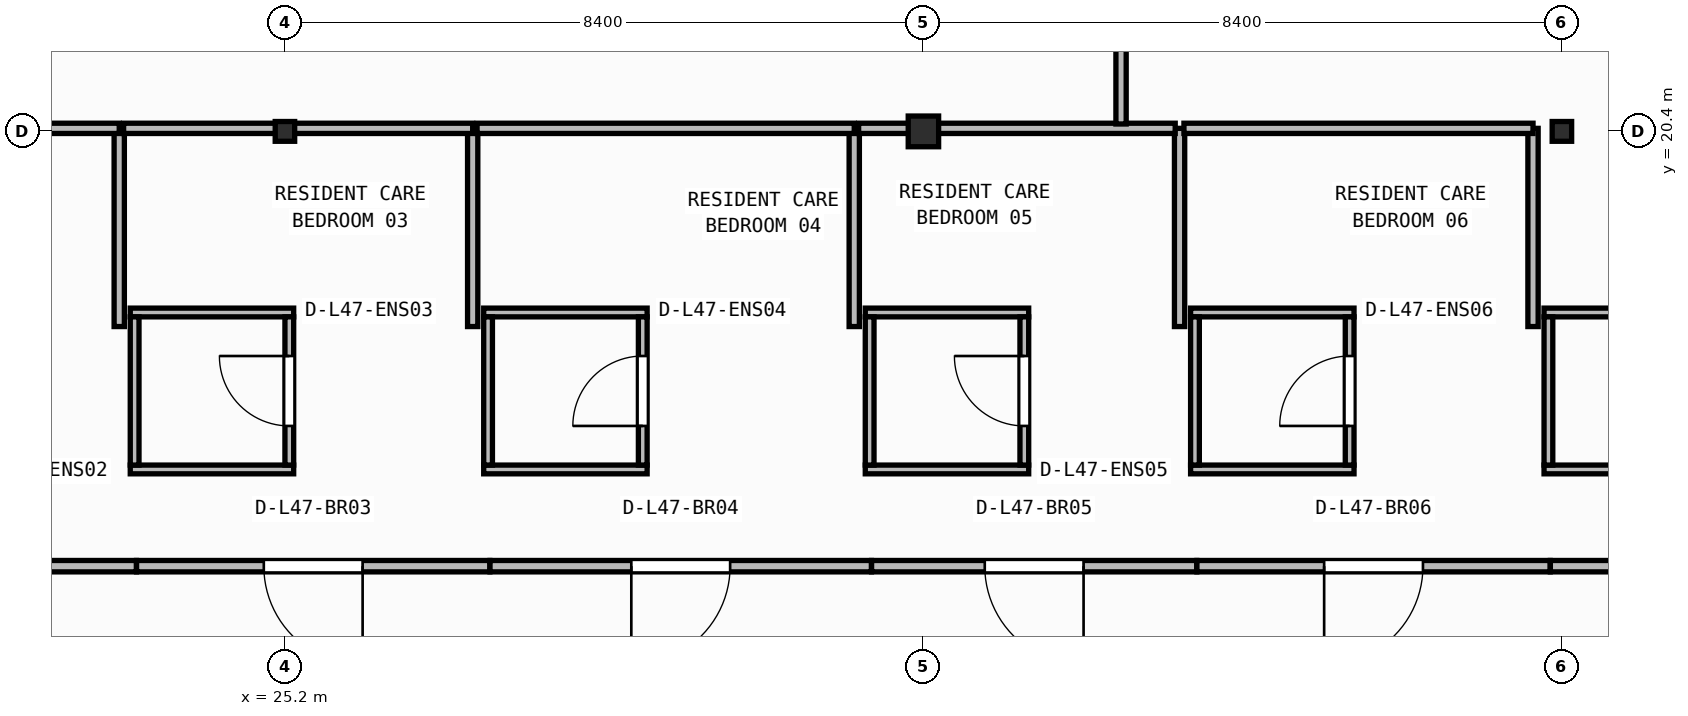
"""IFC4 building model, lengths in metres.
Left out: names, types, materials, properties, quantities, classifications, styles, units other than length and angle.
Written with IfcOpenShell. Run it as: python <this file> out.ifc"""

import sys

from ifc_helpers import new_model, si_unit, direction, frame, frame_2d, origin, origin_2d, place, context, subcontext, project, spatial, rectangle, i_section, extrude, element, fill, save


model = new_model("IFC4")
c1 = context("Model", 3, precision=1e-05, world=origin(), true_north=direction((0.0, 1.0)))
c2 = subcontext(c1, "Body", "Model", "MODEL_VIEW")
j1 = project(units=[si_unit("LENGTHUNIT", "METRE"), si_unit("PLANEANGLEUNIT", "RADIAN")], contexts=[c1])
p1 = place(None, origin())
s1 = spatial("IfcSite", under=j1, at=p1, CompositionType="ELEMENT")
p2 = place(p1, origin())
s2 = spatial("IfcBuilding", under=s1, at=p2, CompositionType="ELEMENT")
p3 = place(p2, frame((0.0, 0.0, 192.1)))
s3 = spatial("IfcBuildingStorey", under=s2, at=p3, CompositionType="ELEMENT", Elevation=192.1)
p4 = place(p3, frame((25.2, 20.4, 0.0), z_axis=(0.0, 0.0, 1.0), x_axis=(1.0, 0.0, 0.0)))
e1 = element("IfcColumn", 1, at=p4, inside=s3, PredefinedType="COLUMN", context=c2, shape_type="SweptSolid", body=[
    extrude(i_section(OverallWidth=0.256, OverallDepth=0.26, WebThickness=0.01, FlangeThickness=0.017, FilletRadius=0.013, at=origin_2d()), origin(), (0.0, 0.0, 1.0), 3.95),
])
p5 = place(p3, frame((33.6, 20.4, 0.0), z_axis=(0.0, 0.0, 1.0), x_axis=(1.0, 0.0, 0.0)))
e2 = element("IfcColumn", 2, at=p5, inside=s3, PredefinedType="COLUMN", context=c2, shape_type="SweptSolid", body=[
    extrude(i_section(OverallWidth=0.4, OverallDepth=0.404, WebThickness=0.02, FlangeThickness=0.032, at=origin_2d()), origin(), (0.0, 0.0, 1.0), 3.95),
])
p6 = place(p3, frame((42.0, 20.4, 0.0), z_axis=(0.0, 0.0, 1.0), x_axis=(1.0, 0.0, 0.0)))
e3 = element("IfcColumn", 3, at=p6, inside=s3, PredefinedType="COLUMN", context=c2, shape_type="SweptSolid", body=[
    extrude(i_section(OverallWidth=0.256, OverallDepth=0.26, WebThickness=0.01, FlangeThickness=0.017, FilletRadius=0.013, at=origin_2d()), origin(), (0.0, 0.0, 1.0), 3.95),
])
p7 = place(p3, frame((23.165, 15.952, 0.0), z_axis=(0.0, 0.0, 1.0), x_axis=(1.0, 0.0, 0.0)))
e4 = element("IfcWall", 4, at=p7, inside=s3, PredefinedType="PARTITIONING", context=c2, shape_type="SweptSolid", body=[
    extrude(rectangle(XDim=2.15, YDim=0.115, at=frame_2d((1.075, 0.0))), origin(), (0.0, 0.0, 1.0), 3.329),
])
p8 = place(p3, frame((23.165, 18.018, 0.0), z_axis=(0.0, 0.0, 1.0), x_axis=(1.0, 0.0, 0.0)))
e5 = element("IfcWall", 5, at=p8, inside=s3, PredefinedType="PARTITIONING", context=c2, shape_type="SweptSolid", body=[
    extrude(rectangle(XDim=2.15, YDim=0.115, at=frame_2d((1.075, 0.0))), origin(), (0.0, 0.0, 1.0), 3.71),
])
p9 = place(p3, frame((23.222, 16.01, 0.0), z_axis=(0.0, 0.0, 1.0), x_axis=(0.0, 1.0, 0.0)))
e6 = element("IfcWall", 6, at=p9, inside=s3, PredefinedType="PARTITIONING", context=c2, shape_type="SweptSolid", body=[
    extrude(rectangle(XDim=1.95, YDim=0.115, at=frame_2d((0.975, 0.0))), origin(), (0.0, 0.0, 1.0), 3.71),
])
p10 = place(p3, frame((25.258, 16.01, 0.0), z_axis=(0.0, 0.0, 1.0), x_axis=(0.0, 1.0, 0.0)))
e7 = element("IfcWall", 7, at=p10, inside=s3, PredefinedType="PARTITIONING", context=c2, shape_type="SweptSolid", body=[
    extrude(rectangle(XDim=1.95, YDim=0.115, at=frame_2d((0.975, 0.0))), origin(), (0.0, 0.0, 1.0), 3.152),
])
p11 = place(p10, frame((0.515, 0.0, 0.0)))
e8 = element("IfcOpeningElement", 8, at=p11, cuts=e7, PredefinedType="OPENING", context=c2, shape_type="SweptSolid", body=[
    extrude(rectangle(XDim=0.92, YDim=2.1, at=frame_2d((0.46, 1.05))), frame((0.0, 0.067, 0.0), z_axis=(0.0, -1.0, 0.0), x_axis=(1.0, 0.0, 0.0)), (0.0, 0.0, 1.0), 0.135),
])
p12 = place(p3, frame((27.815, 15.952, 0.0), z_axis=(0.0, 0.0, 1.0), x_axis=(1.0, 0.0, 0.0)))
e9 = element("IfcWall", 9, at=p12, inside=s3, PredefinedType="PARTITIONING", context=c2, shape_type="SweptSolid", body=[
    extrude(rectangle(XDim=2.15, YDim=0.115, at=frame_2d((1.075, 0.0))), origin(), (0.0, 0.0, 1.0), 3.329),
])
p13 = place(p3, frame((27.815, 18.018, 0.0), z_axis=(0.0, 0.0, 1.0), x_axis=(1.0, 0.0, 0.0)))
e10 = element("IfcWall", 10, at=p13, inside=s3, PredefinedType="PARTITIONING", context=c2, shape_type="SweptSolid", body=[
    extrude(rectangle(XDim=2.15, YDim=0.115, at=frame_2d((1.075, 0.0))), origin(), (0.0, 0.0, 1.0), 3.71),
])
p14 = place(p3, frame((27.873, 16.01, 0.0), z_axis=(0.0, 0.0, 1.0), x_axis=(0.0, 1.0, 0.0)))
e11 = element("IfcWall", 11, at=p14, inside=s3, PredefinedType="PARTITIONING", context=c2, shape_type="SweptSolid", body=[
    extrude(rectangle(XDim=1.95, YDim=0.115, at=frame_2d((0.975, 0.0))), origin(), (0.0, 0.0, 1.0), 3.71),
])
p15 = place(p3, frame((29.907, 16.01, 0.0), z_axis=(0.0, 0.0, 1.0), x_axis=(0.0, 1.0, 0.0)))
e12 = element("IfcWall", 12, at=p15, inside=s3, PredefinedType="PARTITIONING", context=c2, shape_type="SweptSolid", body=[
    extrude(rectangle(XDim=1.95, YDim=0.115, at=frame_2d((0.975, 0.0))), origin(), (0.0, 0.0, 1.0), 3.71),
])
p16 = place(p15, frame((0.515, 0.0, 0.0)))
e13 = element("IfcOpeningElement", 13, at=p16, cuts=e12, PredefinedType="OPENING", context=c2, shape_type="SweptSolid", body=[
    extrude(rectangle(XDim=0.92, YDim=2.1, at=frame_2d((0.46, 1.05))), frame((0.0, 0.067, 0.0), z_axis=(0.0, -1.0, 0.0), x_axis=(1.0, 0.0, 0.0)), (0.0, 0.0, 1.0), 0.135),
])
p17 = place(p3, frame((32.835, 15.952, 0.0), z_axis=(0.0, 0.0, 1.0), x_axis=(1.0, 0.0, 0.0)))
e14 = element("IfcWall", 14, at=p17, inside=s3, PredefinedType="PARTITIONING", context=c2, shape_type="SweptSolid", body=[
    extrude(rectangle(XDim=2.15, YDim=0.115, at=frame_2d((1.075, 0.0))), origin(), (0.0, 0.0, 1.0), 3.329),
])
p18 = place(p3, frame((32.835, 18.018, 0.0), z_axis=(0.0, 0.0, 1.0), x_axis=(1.0, 0.0, 0.0)))
e15 = element("IfcWall", 15, at=p18, inside=s3, PredefinedType="PARTITIONING", context=c2, shape_type="SweptSolid", body=[
    extrude(rectangle(XDim=2.15, YDim=0.115, at=frame_2d((1.075, 0.0))), origin(), (0.0, 0.0, 1.0), 3.71),
])
p19 = place(p3, frame((32.893, 16.01, 0.0), z_axis=(0.0, 0.0, 1.0), x_axis=(0.0, 1.0, 0.0)))
e16 = element("IfcWall", 16, at=p19, inside=s3, PredefinedType="PARTITIONING", context=c2, shape_type="SweptSolid", body=[
    extrude(rectangle(XDim=1.95, YDim=0.115, at=frame_2d((0.975, 0.0))), origin(), (0.0, 0.0, 1.0), 3.71),
])
p20 = place(p3, frame((34.927, 16.01, 0.0), z_axis=(0.0, 0.0, 1.0), x_axis=(0.0, 1.0, 0.0)))
e17 = element("IfcWall", 17, at=p20, inside=s3, PredefinedType="PARTITIONING", context=c2, shape_type="SweptSolid", body=[
    extrude(rectangle(XDim=1.95, YDim=0.115, at=frame_2d((0.975, 0.0))), origin(), (0.0, 0.0, 1.0), 3.71),
])
p21 = place(p20, frame((0.515, 0.0, 0.0)))
e18 = element("IfcOpeningElement", 18, at=p21, cuts=e17, PredefinedType="OPENING", context=c2, shape_type="SweptSolid", body=[
    extrude(rectangle(XDim=0.92, YDim=2.1, at=frame_2d((0.46, 1.05))), frame((0.0, 0.067, 0.0), z_axis=(0.0, -1.0, 0.0), x_axis=(1.0, 0.0, 0.0)), (0.0, 0.0, 1.0), 0.135),
])
p22 = place(p3, frame((37.115, 15.952, 0.0), z_axis=(0.0, 0.0, 1.0), x_axis=(1.0, 0.0, 0.0)))
e19 = element("IfcWall", 19, at=p22, inside=s3, PredefinedType="PARTITIONING", context=c2, shape_type="SweptSolid", body=[
    extrude(rectangle(XDim=2.15, YDim=0.115, at=frame_2d((1.075, 0.0))), origin(), (0.0, 0.0, 1.0), 3.329),
])
p23 = place(p3, frame((37.115, 18.018, 0.0), z_axis=(0.0, 0.0, 1.0), x_axis=(1.0, 0.0, 0.0)))
e20 = element("IfcWall", 20, at=p23, inside=s3, PredefinedType="PARTITIONING", context=c2, shape_type="SweptSolid", body=[
    extrude(rectangle(XDim=2.15, YDim=0.115, at=frame_2d((1.075, 0.0))), origin(), (0.0, 0.0, 1.0), 3.71),
])
p24 = place(p3, frame((37.173, 16.01, 0.0), z_axis=(0.0, 0.0, 1.0), x_axis=(0.0, 1.0, 0.0)))
e21 = element("IfcWall", 21, at=p24, inside=s3, PredefinedType="PARTITIONING", context=c2, shape_type="SweptSolid", body=[
    extrude(rectangle(XDim=1.95, YDim=0.115, at=frame_2d((0.975, 0.0))), origin(), (0.0, 0.0, 1.0), 3.71),
])
p25 = place(p3, frame((39.208, 16.01, 0.0), z_axis=(0.0, 0.0, 1.0), x_axis=(0.0, 1.0, 0.0)))
e22 = element("IfcWall", 22, at=p25, inside=s3, PredefinedType="PARTITIONING", context=c2, shape_type="SweptSolid", body=[
    extrude(rectangle(XDim=1.95, YDim=0.115, at=frame_2d((0.975, 0.0))), origin(), (0.0, 0.0, 1.0), 3.71),
])
p26 = place(p25, frame((0.515, 0.0, 0.0)))
e23 = element("IfcOpeningElement", 23, at=p26, cuts=e22, PredefinedType="OPENING", context=c2, shape_type="SweptSolid", body=[
    extrude(rectangle(XDim=0.92, YDim=2.1, at=frame_2d((0.46, 1.05))), frame((0.0, 0.067, 0.0), z_axis=(0.0, -1.0, 0.0), x_axis=(1.0, 0.0, 0.0)), (0.0, 0.0, 1.0), 0.135),
])
p27 = place(p3, frame((41.765, 15.952, 0.0), z_axis=(0.0, 0.0, 1.0), x_axis=(1.0, 0.0, 0.0)))
e24 = element("IfcWall", 24, at=p27, inside=s3, PredefinedType="PARTITIONING", context=c2, shape_type="SweptSolid", body=[
    extrude(rectangle(XDim=2.15, YDim=0.115, at=frame_2d((1.075, 0.0))), origin(), (0.0, 0.0, 1.0), 3.329),
])
p28 = place(p3, frame((41.765, 18.018, 0.0), z_axis=(0.0, 0.0, 1.0), x_axis=(1.0, 0.0, 0.0)))
e25 = element("IfcWall", 25, at=p28, inside=s3, PredefinedType="PARTITIONING", context=c2, shape_type="SweptSolid", body=[
    extrude(rectangle(XDim=2.15, YDim=0.115, at=frame_2d((1.075, 0.0))), origin(), (0.0, 0.0, 1.0), 3.71),
])
p29 = place(p3, frame((41.823, 16.01, 0.0), z_axis=(0.0, 0.0, 1.0), x_axis=(0.0, 1.0, 0.0)))
e26 = element("IfcWall", 26, at=p29, inside=s3, PredefinedType="PARTITIONING", context=c2, shape_type="SweptSolid", body=[
    extrude(rectangle(XDim=1.95, YDim=0.115, at=frame_2d((0.975, 0.0))), origin(), (0.0, 0.0, 1.0), 3.152),
])
p30 = place(p3, frame((23.246, 14.68, 0.0), z_axis=(0.0, 0.0, 1.0), x_axis=(-1.0, 0.0, 0.0)))
e27 = element("IfcWall", 27, at=p30, inside=s3, PredefinedType="PARTITIONING", context=c2, shape_type="SweptSolid", body=[
    extrude(rectangle(XDim=4.278, YDim=0.15, at=frame_2d((2.139, 0.0))), origin(), (0.0, 0.0, 1.0), 3.71),
])
p31 = place(p30, frame((1.489, 0.0, 0.0)))
e28 = element("IfcOpeningElement", 28, at=p31, cuts=e27, PredefinedType="OPENING", context=c2, shape_type="SweptSolid", body=[
    extrude(rectangle(XDim=1.3, YDim=2.15, at=frame_2d((0.65, 1.075))), frame((0.0, 0.085, 0.0), z_axis=(0.0, -1.0, 0.0), x_axis=(1.0, 0.0, 0.0)), (0.0, 0.0, 1.0), 0.17),
])
p32 = place(p3, frame((27.896, 14.68, 0.0), z_axis=(0.0, 0.0, 1.0), x_axis=(-1.0, 0.0, 0.0)))
e29 = element("IfcWall", 29, at=p32, inside=s3, PredefinedType="PARTITIONING", context=c2, shape_type="SweptSolid", body=[
    extrude(rectangle(XDim=4.648, YDim=0.15, at=frame_2d((2.324, 0.0))), origin(), (0.0, 0.0, 1.0), 3.71),
])
p33 = place(p32, frame((1.674, 0.0, 0.0)))
e30 = element("IfcOpeningElement", 30, at=p33, cuts=e29, PredefinedType="OPENING", context=c2, shape_type="SweptSolid", body=[
    extrude(rectangle(XDim=1.3, YDim=2.15, at=frame_2d((0.65, 1.075))), frame((0.0, 0.085, 0.0), z_axis=(0.0, -1.0, 0.0), x_axis=(1.0, 0.0, 0.0)), (0.0, 0.0, 1.0), 0.17),
])
p34 = place(p3, frame((32.916, 14.68, 0.0), z_axis=(0.0, 0.0, 1.0), x_axis=(-1.0, 0.0, 0.0)))
e31 = element("IfcWall", 31, at=p34, inside=s3, PredefinedType="PARTITIONING", context=c2, shape_type="SweptSolid", body=[
    extrude(rectangle(XDim=5.018, YDim=0.15, at=frame_2d((2.509, 0.0))), origin(), (0.0, 0.0, 1.0), 3.71),
])
p35 = place(p34, frame((1.859, 0.0, 0.0)))
e32 = element("IfcOpeningElement", 32, at=p35, cuts=e31, PredefinedType="OPENING", context=c2, shape_type="SweptSolid", body=[
    extrude(rectangle(XDim=1.3, YDim=2.15, at=frame_2d((0.65, 1.075))), frame((0.0, 0.085, 0.0), z_axis=(0.0, -1.0, 0.0), x_axis=(1.0, 0.0, 0.0)), (0.0, 0.0, 1.0), 0.17),
])
p36 = place(p3, frame((37.196, 14.68, 0.0), z_axis=(0.0, 0.0, 1.0), x_axis=(-1.0, 0.0, 0.0)))
e33 = element("IfcWall", 33, at=p36, inside=s3, PredefinedType="PARTITIONING", context=c2, shape_type="SweptSolid", body=[
    extrude(rectangle(XDim=4.278, YDim=0.15, at=frame_2d((2.139, 0.0))), origin(), (0.0, 0.0, 1.0), 3.71),
])
p37 = place(p36, frame((1.489, 0.0, 0.0)))
e34 = element("IfcOpeningElement", 34, at=p37, cuts=e33, PredefinedType="OPENING", context=c2, shape_type="SweptSolid", body=[
    extrude(rectangle(XDim=1.3, YDim=2.15, at=frame_2d((0.65, 1.075))), frame((0.0, 0.085, 0.0), z_axis=(0.0, -1.0, 0.0), x_axis=(1.0, 0.0, 0.0)), (0.0, 0.0, 1.0), 0.17),
])
p38 = place(p3, frame((41.846, 14.68, 0.0), z_axis=(0.0, 0.0, 1.0), x_axis=(-1.0, 0.0, 0.0)))
e35 = element("IfcWall", 35, at=p38, inside=s3, PredefinedType="PARTITIONING", context=c2, shape_type="SweptSolid", body=[
    extrude(rectangle(XDim=4.648, YDim=0.15, at=frame_2d((2.324, 0.0))), origin(), (0.0, 0.0, 1.0), 3.71),
])
p39 = place(p38, frame((1.674, 0.0, 0.0)))
e36 = element("IfcOpeningElement", 36, at=p39, cuts=e35, PredefinedType="OPENING", context=c2, shape_type="SweptSolid", body=[
    extrude(rectangle(XDim=1.3, YDim=2.15, at=frame_2d((0.65, 1.075))), frame((0.0, 0.085, 0.0), z_axis=(0.0, -1.0, 0.0), x_axis=(1.0, 0.0, 0.0)), (0.0, 0.0, 1.0), 0.17),
])
p40 = place(p3, frame((46.866, 14.68, 0.0), z_axis=(0.0, 0.0, 1.0), x_axis=(-1.0, 0.0, 0.0)))
e37 = element("IfcWall", 37, at=p40, inside=s3, PredefinedType="PARTITIONING", context=c2, shape_type="SweptSolid", body=[
    extrude(rectangle(XDim=5.018, YDim=0.15, at=frame_2d((2.509, 0.0))), origin(), (0.0, 0.0, 1.0), 3.71),
])
p41 = place(p40, frame((1.859, 0.0, 0.0)))
e38 = element("IfcOpeningElement", 38, at=p41, cuts=e37, PredefinedType="OPENING", context=c2, shape_type="SweptSolid", body=[
    extrude(rectangle(XDim=1.3, YDim=2.15, at=frame_2d((0.65, 1.075))), frame((0.0, 0.085, 0.0), z_axis=(0.0, -1.0, 0.0), x_axis=(1.0, 0.0, 0.0)), (0.0, 0.0, 1.0), 0.17),
])
p42 = place(p3, frame((23.02, 17.833, 0.0), z_axis=(0.0, 0.0, 1.0), x_axis=(0.0, 1.0, 0.0)))
e39 = element("IfcWall", 39, at=p42, inside=s3, PredefinedType="PARTITIONING", context=c2, shape_type="SweptSolid", body=[
    extrude(rectangle(XDim=2.607, YDim=0.135, at=frame_2d((1.304, 0.0))), origin(), (0.0, 0.0, 1.0), 3.71),
])
p43 = place(p3, frame((23.02, 20.44, 0.0), z_axis=(0.0, 0.0, 1.0), x_axis=(-1.0, 0.0, 0.0)))
e40 = element("IfcWall", 40, at=p43, inside=s3, PredefinedType="PARTITIONING", context=c2, shape_type="SweptSolid", body=[
    extrude(rectangle(XDim=4.222, YDim=0.135, at=frame_2d((2.111, 0.0))), origin(), (0.0, 0.0, 1.0), 3.152),
])
p44 = place(p3, frame((27.67, 17.833, 0.0), z_axis=(0.0, 0.0, 1.0), x_axis=(0.0, 1.0, 0.0)))
e41 = element("IfcWall", 41, at=p44, inside=s3, PredefinedType="PARTITIONING", context=c2, shape_type="SweptSolid", body=[
    extrude(rectangle(XDim=2.607, YDim=0.135, at=frame_2d((1.304, 0.0))), origin(), (0.0, 0.0, 1.0), 3.71),
])
p45 = place(p3, frame((27.67, 20.44, 0.0), z_axis=(0.0, 0.0, 1.0), x_axis=(-1.0, 0.0, 0.0)))
e42 = element("IfcWall", 42, at=p45, inside=s3, PredefinedType="PARTITIONING", context=c2, shape_type="SweptSolid", body=[
    extrude(rectangle(XDim=4.593, YDim=0.135, at=frame_2d((2.296, 0.0))), origin(), (0.0, 0.0, 1.0), 3.152),
])
p46 = place(p3, frame((32.69, 17.833, 0.0), z_axis=(0.0, 0.0, 1.0), x_axis=(0.0, 1.0, 0.0)))
e43 = element("IfcWall", 43, at=p46, inside=s3, PredefinedType="PARTITIONING", context=c2, shape_type="SweptSolid", body=[
    extrude(rectangle(XDim=2.607, YDim=0.135, at=frame_2d((1.304, 0.0))), origin(), (0.0, 0.0, 1.0), 3.71),
])
p47 = place(p3, frame((32.69, 20.44, 0.0), z_axis=(0.0, 0.0, 1.0), x_axis=(-1.0, 0.0, 0.0)))
e44 = element("IfcWall", 44, at=p47, inside=s3, PredefinedType="PARTITIONING", context=c2, shape_type="SweptSolid", body=[
    extrude(rectangle(XDim=4.962, YDim=0.135, at=frame_2d((2.481, 0.0))), origin(), (0.0, 0.0, 1.0), 3.152),
])
p48 = place(p3, frame((36.97, 17.833, 0.0), z_axis=(0.0, 0.0, 1.0), x_axis=(0.0, 1.0, 0.0)))
e45 = element("IfcWall", 45, at=p48, inside=s3, PredefinedType="PARTITIONING", context=c2, shape_type="SweptSolid", body=[
    extrude(rectangle(XDim=2.607, YDim=0.135, at=frame_2d((1.304, 0.0))), origin(), (0.0, 0.0, 1.0), 3.71),
])
p49 = place(p3, frame((36.913, 20.44, 0.0), z_axis=(0.0, 0.0, 1.0), x_axis=(-1.0, 0.0, 0.0)))
e46 = element("IfcWall", 46, at=p49, inside=s3, PredefinedType="PARTITIONING", context=c2, shape_type="SweptSolid", body=[
    extrude(rectangle(XDim=4.165, YDim=0.135, at=frame_2d((2.083, 0.0))), origin(), (0.0, 0.0, 1.0), 3.152),
])
p50 = place(p3, frame((41.62, 17.833, 0.0), z_axis=(0.0, 0.0, 1.0), x_axis=(0.0, 1.0, 0.0)))
e47 = element("IfcWall", 47, at=p50, inside=s3, PredefinedType="PARTITIONING", context=c2, shape_type="SweptSolid", body=[
    extrude(rectangle(XDim=2.607, YDim=0.135, at=frame_2d((1.304, 0.0))), origin(), (0.0, 0.0, 1.0), 3.152),
])
p51 = place(p3, frame((41.62, 20.44, 0.0), z_axis=(0.0, 0.0, 1.0), x_axis=(-1.0, 0.0, 0.0)))
e48 = element("IfcWall", 48, at=p51, inside=s3, PredefinedType="PARTITIONING", context=c2, shape_type="SweptSolid", body=[
    extrude(rectangle(XDim=4.593, YDim=0.135, at=frame_2d((2.296, 0.0))), origin(), (0.0, 0.0, 1.0), 3.152),
])
p52 = place(p3, frame((36.2, 20.498, 0.0), z_axis=(0.0, 0.0, 1.0), x_axis=(0.0, 1.0, 0.0)))
e49 = element("IfcWall", 49, at=p52, inside=s3, PredefinedType="PARTITIONING", context=c2, shape_type="SweptSolid", body=[
    extrude(rectangle(XDim=6.642, YDim=0.135, at=frame_2d((3.321, 0.0))), origin(), (0.0, 0.0, 1.0), 3.71),
])
p53 = place(p52, frame((2.771, 0.0, 0.0)))
e50 = element("IfcOpeningElement", 50, at=p53, cuts=e49, PredefinedType="OPENING", context=c2, shape_type="SweptSolid", body=[
    extrude(rectangle(XDim=1.1, YDim=2.1, at=frame_2d((0.55, 1.05))), frame((0.0, 0.077, 0.0), z_axis=(0.0, -1.0, 0.0), x_axis=(1.0, 0.0, 0.0)), (0.0, 0.0, 1.0), 0.155),
])
p54 = place(p11, origin())
e51 = element("IfcDoor", 51, at=p54, inside=s3, OperationType="SINGLE_SWING_RIGHT", PredefinedType="DOOR", context=c2, shape_type="SweptSolid", body=[
    extrude(rectangle(XDim=0.92, YDim=2.1, at=frame_2d((0.46, 1.05))), frame((0.0, 0.025, 0.0), z_axis=(0.0, -1.0, 0.0), x_axis=(1.0, 0.0, 0.0)), (0.0, 0.0, 1.0), 0.05),
])
fill(e8, e51)
p55 = place(p16, origin())
e52 = element("IfcDoor", 52, at=p55, inside=s3, OperationType="SINGLE_SWING_LEFT", PredefinedType="DOOR", context=c2, shape_type="SweptSolid", body=[
    extrude(rectangle(XDim=0.92, YDim=2.1, at=frame_2d((0.46, 1.05))), frame((0.0, 0.025, 0.0), z_axis=(0.0, -1.0, 0.0), x_axis=(1.0, 0.0, 0.0)), (0.0, 0.0, 1.0), 0.05),
])
fill(e13, e52)
p56 = place(p21, origin())
e53 = element("IfcDoor", 53, at=p56, inside=s3, OperationType="SINGLE_SWING_RIGHT", PredefinedType="DOOR", context=c2, shape_type="SweptSolid", body=[
    extrude(rectangle(XDim=0.92, YDim=2.1, at=frame_2d((0.46, 1.05))), frame((0.0, 0.025, 0.0), z_axis=(0.0, -1.0, 0.0), x_axis=(1.0, 0.0, 0.0)), (0.0, 0.0, 1.0), 0.05),
])
fill(e18, e53)
p57 = place(p26, origin())
e54 = element("IfcDoor", 54, at=p57, inside=s3, OperationType="SINGLE_SWING_LEFT", PredefinedType="DOOR", context=c2, shape_type="SweptSolid", body=[
    extrude(rectangle(XDim=0.92, YDim=2.1, at=frame_2d((0.46, 1.05))), frame((0.0, 0.025, 0.0), z_axis=(0.0, -1.0, 0.0), x_axis=(1.0, 0.0, 0.0)), (0.0, 0.0, 1.0), 0.05),
])
fill(e23, e54)
p58 = place(p33, origin())
e55 = element("IfcDoor", 55, at=p58, inside=s3, OperationType="SINGLE_SWING_LEFT", PredefinedType="DOOR", context=c2, shape_type="SweptSolid", body=[
    extrude(rectangle(XDim=1.3, YDim=2.15, at=frame_2d((0.65, 1.075))), frame((0.0, 0.025, 0.0), z_axis=(0.0, -1.0, 0.0), x_axis=(1.0, 0.0, 0.0)), (0.0, 0.0, 1.0), 0.05),
])
fill(e30, e55)
p59 = place(p35, origin())
e56 = element("IfcDoor", 56, at=p59, inside=s3, OperationType="SINGLE_SWING_RIGHT", PredefinedType="DOOR", context=c2, shape_type="SweptSolid", body=[
    extrude(rectangle(XDim=1.3, YDim=2.15, at=frame_2d((0.65, 1.075))), frame((0.0, 0.025, 0.0), z_axis=(0.0, -1.0, 0.0), x_axis=(1.0, 0.0, 0.0)), (0.0, 0.0, 1.0), 0.05),
])
fill(e32, e56)
p60 = place(p37, origin())
e57 = element("IfcDoor", 57, at=p60, inside=s3, OperationType="SINGLE_SWING_LEFT", PredefinedType="DOOR", context=c2, shape_type="SweptSolid", body=[
    extrude(rectangle(XDim=1.3, YDim=2.15, at=frame_2d((0.65, 1.075))), frame((0.0, 0.025, 0.0), z_axis=(0.0, -1.0, 0.0), x_axis=(1.0, 0.0, 0.0)), (0.0, 0.0, 1.0), 0.05),
])
fill(e34, e57)
p61 = place(p39, origin())
e58 = element("IfcDoor", 58, at=p61, inside=s3, OperationType="SINGLE_SWING_RIGHT", PredefinedType="DOOR", context=c2, shape_type="SweptSolid", body=[
    extrude(rectangle(XDim=1.3, YDim=2.15, at=frame_2d((0.65, 1.075))), frame((0.0, 0.025, 0.0), z_axis=(0.0, -1.0, 0.0), x_axis=(1.0, 0.0, 0.0)), (0.0, 0.0, 1.0), 0.05),
])
fill(e36, e58)
save(model, sys.argv[1])
